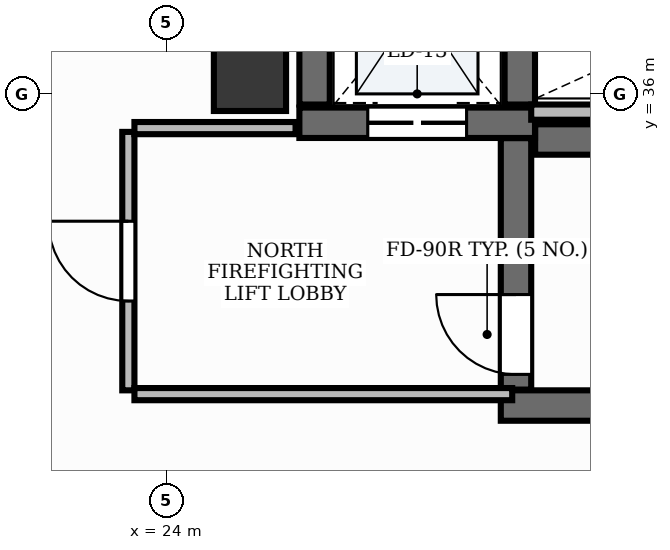
"""IFC4 building model, lengths in metres.
Left out: names, types, materials, properties, quantities, classifications, styles, units other than length and angle.
Written with IfcOpenShell. Run it as: python <this file> out.ifc"""

import sys

from ifc_helpers import new_model, si_unit, direction, frame, frame_2d, origin, origin_2d, place, context, subcontext, project, spatial, rectangle, extrude, element, fill, save


model = new_model("IFC4")
c1 = context("Model", 3, precision=1e-05, world=origin(), true_north=direction((0.0, 1.0)))
c2 = subcontext(c1, "Body", "Model", "MODEL_VIEW")
j1 = project(units=[si_unit("LENGTHUNIT", "METRE"), si_unit("PLANEANGLEUNIT", "RADIAN")], contexts=[c1])
p1 = place(None, origin())
s1 = spatial("IfcSite", under=j1, at=p1, CompositionType="ELEMENT")
p2 = place(p1, origin())
s2 = spatial("IfcBuilding", under=s1, at=p2, CompositionType="ELEMENT")
p3 = place(p2, frame((0.0, 0.0, 196.2)))
s3 = spatial("IfcBuildingStorey", under=s2, at=p3, CompositionType="ELEMENT", Elevation=196.2)
p4 = place(p3, frame((28.852, 35.4, 0.0), z_axis=(0.0, 0.0, 1.0), x_axis=(1.0, 0.0, 0.0)))
e1 = element("IfcWall", 1, at=p4, inside=s3, PredefinedType="SHEAR", context=c2, shape_type="SweptSolid", body=[
    extrude(rectangle(XDim=8.198, YDim=0.4, at=frame_2d((4.099, 0.0))), origin(), (0.0, 0.0, 1.0), 3.9),
])
p5 = place(p3, frame((28.4, 31.9, 0.0), z_axis=(0.0, 0.0, 1.0), x_axis=(1.0, 0.0, 0.0)))
e2 = element("IfcWall", 2, at=p5, inside=s3, PredefinedType="SHEAR", context=c2, shape_type="SweptSolid", body=[
    extrude(rectangle(XDim=8.65, YDim=0.4, at=frame_2d((4.325, 0.0))), origin(), (0.0, 0.0, 1.0), 3.9),
])
p6 = place(p3, frame((28.6, 32.11, 0.0), z_axis=(0.0, 0.0, 1.0), x_axis=(0.0, 1.0, 0.0)))
e3 = element("IfcWall", 3, at=p6, inside=s3, PredefinedType="SHEAR", context=c2, shape_type="SweptSolid", body=[
    extrude(rectangle(XDim=3.308, YDim=0.4, at=frame_2d((1.654, 0.0))), origin(), (0.0, 0.0, 1.0), 3.9),
])
p7 = place(p6, frame((0.2, 0.0, 0.0)))
e4 = element("IfcOpeningElement", 4, at=p7, cuts=e3, PredefinedType="OPENING", context=c2, shape_type="SweptSolid", body=[
    extrude(rectangle(XDim=1.05, YDim=2.15, at=frame_2d((0.525, 1.075))), frame((0.0, 0.215, 0.0), z_axis=(0.0, -1.0, 0.0), x_axis=(1.0, 0.0, 0.0)), (0.0, 0.0, 1.0), 0.43),
])
p8 = place(p3, frame((25.75, 35.62, 0.0), z_axis=(0.0, 0.0, 1.0), x_axis=(1.0, 0.0, 0.0)))
e5 = element("IfcWall", 5, at=p8, inside=s3, PredefinedType="SHEAR", context=c2, shape_type="SweptSolid", body=[
    extrude(rectangle(XDim=3.1, YDim=0.4, at=frame_2d((1.55, 0.0))), origin(), (0.0, 0.0, 1.0), 3.9),
])
p9 = place(p8, frame((0.9, 0.0, 0.0)))
e6 = element("IfcOpeningElement", 6, at=p9, cuts=e5, PredefinedType="OPENING", context=c2, shape_type="SweptSolid", body=[
    extrude(rectangle(XDim=1.3, YDim=2.2, at=frame_2d((0.65, 1.1))), frame((0.0, 0.215, 0.0), z_axis=(0.0, -1.0, 0.0), x_axis=(1.0, 0.0, 0.0)), (0.0, 0.0, 1.0), 0.43),
])
for number, where, z_axis, x_axis in (
    (7, (25.95, 35.86, 0.0), (0.0, 0.0, 1.0), (0.0, 1.0, 0.0)),
    (8, (28.65, 35.86, 0.0), (0.0, 0.0, 1.0), (0.0, 1.0, 0.0)),
):
    element("IfcWall", number, at=place(p3, frame(where, z_axis=z_axis, x_axis=x_axis)), inside=s3, PredefinedType="SHEAR", context=c2, shape_type="SweptSolid", body=[
        extrude(rectangle(XDim=2.7, YDim=0.4, at=frame_2d((1.35, 0.0))), origin(), (0.0, 0.0, 1.0), 3.9),
    ])
p10 = place(p3, frame((25.1, 36.25, -0.0), z_axis=(0.0, 0.0, 1.0), x_axis=(1.0, 0.0, 0.0)))
e9 = element("IfcColumn", 9, at=p10, inside=s3, PredefinedType="PILASTER", context=c2, shape_type="SweptSolid", body=[
    extrude(rectangle(XDim=0.95, YDim=0.95, at=origin_2d()), origin(), (0.0, 0.0, 1.0), 3.901),
])
p11 = place(p3, frame((28.8, 35.76, 0.0), z_axis=(0.0, 0.0, 1.0), x_axis=(1.0, 0.0, 0.0)))
e10 = element("IfcWall", 10, at=p11, inside=s3, PredefinedType="PARTITIONING", context=c2, shape_type="SweptSolid", body=[
    extrude(rectangle(XDim=4.57, YDim=0.2, at=frame_2d((2.285, 0.0))), origin(), (0.0, 0.0, 1.0), 2.22),
])
p12 = place(p3, frame((23.5, 32.1, 0.0), z_axis=(0.0, 0.0, 1.0), x_axis=(0.0, 1.0, 0.0)))
e11 = element("IfcWall", 11, at=p12, inside=s3, PredefinedType="PARTITIONING", context=c2, shape_type="SweptSolid", body=[
    extrude(rectangle(XDim=3.4, YDim=0.16, at=frame_2d((1.7, 0.0))), origin(), (0.0, 0.0, 1.0), 2.22),
])
p13 = place(p12, frame((1.175, 0.0, 0.0)))
e12 = element("IfcOpeningElement", 12, at=p13, cuts=e11, PredefinedType="OPENING", context=c2, shape_type="SweptSolid", body=[
    extrude(rectangle(XDim=1.05, YDim=2.15, at=frame_2d((0.525, 1.075))), frame((0.0, 0.095, 0.0), z_axis=(0.0, -1.0, 0.0), x_axis=(1.0, 0.0, 0.0)), (0.0, 0.0, 1.0), 0.19),
])
p14 = place(p3, frame((23.58, 32.05, 0.0), z_axis=(0.0, 0.0, 1.0), x_axis=(1.0, 0.0, 0.0)))
e13 = element("IfcWall", 13, at=p14, inside=s3, PredefinedType="PARTITIONING", context=c2, shape_type="SweptSolid", body=[
    extrude(rectangle(XDim=4.97, YDim=0.16, at=frame_2d((2.485, 0.0))), origin(), (0.0, 0.0, 1.0), 2.22),
])
p15 = place(p3, frame((23.58, 35.55, 0.0), z_axis=(0.0, 0.0, 1.0), x_axis=(1.0, 0.0, 0.0)))
e14 = element("IfcWall", 14, at=p15, inside=s3, PredefinedType="PARTITIONING", context=c2, shape_type="SweptSolid", body=[
    extrude(rectangle(XDim=2.12, YDim=0.16, at=frame_2d((1.06, 0.0))), origin(), (0.0, 0.0, 1.0), 2.22),
])
p16 = place(p7, origin())
e15 = element("IfcDoor", 15, at=p16, inside=s3, OperationType="SINGLE_SWING_RIGHT", PredefinedType="DOOR", context=c2, shape_type="SweptSolid", body=[
    extrude(rectangle(XDim=1.05, YDim=2.15, at=frame_2d((0.525, 1.075))), frame((0.0, 0.025, 0.0), z_axis=(0.0, -1.0, 0.0), x_axis=(1.0, 0.0, 0.0)), (0.0, 0.0, 1.0), 0.05),
])
fill(e4, e15)
p17 = place(p9, origin())
e16 = element("IfcDoor", 16, at=p17, inside=s3, OperationType="DOUBLE_DOOR_SLIDING", PredefinedType="DOOR", context=c2, shape_type="SweptSolid", body=[
    extrude(rectangle(XDim=1.3, YDim=2.2, at=frame_2d((0.65, 1.1))), frame((0.0, 0.025, 0.0), z_axis=(0.0, -1.0, 0.0), x_axis=(1.0, 0.0, 0.0)), (0.0, 0.0, 1.0), 0.05),
])
fill(e6, e16)
p18 = place(p13, origin())
e17 = element("IfcDoor", 17, at=p18, inside=s3, OperationType="SINGLE_SWING_RIGHT", PredefinedType="DOOR", context=c2, shape_type="SweptSolid", body=[
    extrude(rectangle(XDim=1.05, YDim=2.15, at=frame_2d((0.525, 1.075))), frame((0.0, 0.025, 0.0), z_axis=(0.0, -1.0, 0.0), x_axis=(1.0, 0.0, 0.0)), (0.0, 0.0, 1.0), 0.05),
])
fill(e12, e17)
save(model, sys.argv[1])
